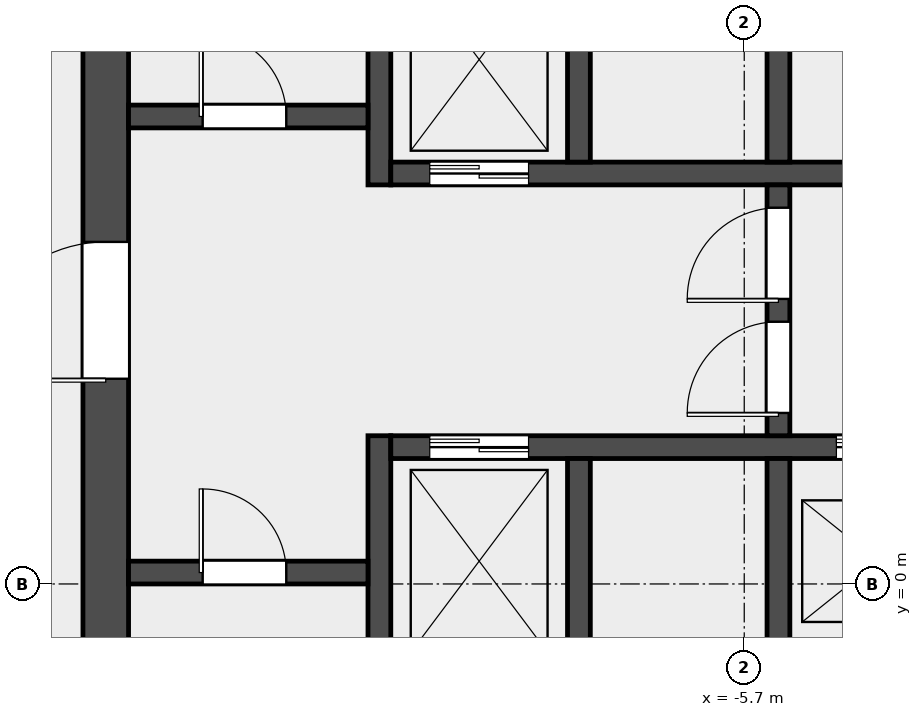
"""IFC4 building model, lengths in metres.
Left out: names, types, materials, properties, quantities, classifications, styles, units other than length and angle.
Written with IfcOpenShell. Run it as: python <this file> out.ifc"""

import sys

from ifc_helpers import new_model, si_unit, direction, frame, frame_2d, origin, place, context, subcontext, project, spatial, rectangle, extrude, element, fill, save


model = new_model("IFC4")
c1 = context("Model", 3, precision=1e-05, world=origin(), true_north=direction((0.0, 1.0)))
c2 = subcontext(c1, "Body", "Model", "MODEL_VIEW")
j1 = project(units=[si_unit("LENGTHUNIT", "METRE"), si_unit("PLANEANGLEUNIT", "RADIAN")], contexts=[c1])
p1 = place(None, origin())
s1 = spatial("IfcSite", under=j1, at=p1, CompositionType="ELEMENT")
p2 = place(p1, origin())
s2 = spatial("IfcBuilding", under=s1, at=p2, CompositionType="ELEMENT")
p3 = place(p2, frame((0.0, 0.0, 139.6)))
s3 = spatial("IfcBuildingStorey", under=s2, at=p3, CompositionType="ELEMENT", Elevation=139.6)
p4 = place(p3, frame((-14.1, -6.6, 0.0), z_axis=(0.0, 0.0, 1.0), x_axis=(0.0, 1.0, 0.0)))
e1 = element("IfcWall", 1, at=p4, inside=s3, PredefinedType="SHEAR", context=c2, shape_type="SweptSolid", body=[
    extrude(rectangle(XDim=19.5, YDim=0.6, at=frame_2d((9.75, 0.0))), origin(), (0.0, 0.0, 1.0), 4.2),
])
p5 = place(p4, frame((9.3, 0.0, 0.0)))
e2 = element("IfcOpeningElement", 2, at=p5, cuts=e1, PredefinedType="OPENING", context=c2, shape_type="SweptSolid", body=[
    extrude(rectangle(XDim=1.8, YDim=2.1, at=frame_2d((0.9, 1.05))), frame((0.0, 0.312, 0.0), z_axis=(0.0, -1.0, 0.0), x_axis=(1.0, 0.0, 0.0)), (0.0, 0.0, 1.0), 0.624),
])
p6 = place(p3, frame((-10.5, -6.6, 0.0), z_axis=(0.0, 0.0, 1.0), x_axis=(0.0, 1.0, 0.0)))
e3 = element("IfcWall", 3, at=p6, inside=s3, PredefinedType="SHEAR", context=c2, shape_type="SweptSolid", body=[
    extrude(rectangle(XDim=8.55, YDim=0.3, at=frame_2d((4.275, 0.0))), origin(), (0.0, 0.0, 1.0), 4.2),
])
p7 = place(p3, frame((-10.5, 5.25, 0.0), z_axis=(0.0, 0.0, 1.0), x_axis=(0.0, 1.0, 0.0)))
e4 = element("IfcWall", 4, at=p7, inside=s3, PredefinedType="SHEAR", context=c2, shape_type="SweptSolid", body=[
    extrude(rectangle(XDim=7.65, YDim=0.3, at=frame_2d((3.825, 0.0))), origin(), (0.0, 0.0, 1.0), 4.2),
])
p8 = place(p3, frame((-13.8, 0.15, 0.0), z_axis=(0.0, 0.0, 1.0), x_axis=(1.0, 0.0, 0.0)))
e5 = element("IfcWall", 5, at=p8, inside=s3, PredefinedType="SOLIDWALL", context=c2, shape_type="SweptSolid", body=[
    extrude(rectangle(XDim=3.15, YDim=0.3, at=frame_2d((1.575, 0.0))), origin(), (0.0, 0.0, 1.0), 4.2),
])
p9 = place(p8, frame((0.975, 0.0, 0.0)))
e6 = element("IfcOpeningElement", 6, at=p9, cuts=e5, PredefinedType="OPENING", context=c2, shape_type="SweptSolid", body=[
    extrude(rectangle(XDim=1.1, YDim=2.1, at=frame_2d((0.55, 1.05))), frame((0.0, 0.162, 0.0), z_axis=(0.0, -1.0, 0.0), x_axis=(1.0, 0.0, 0.0)), (0.0, 0.0, 1.0), 0.324),
])
p10 = place(p3, frame((-13.8, 6.15, 0.0), z_axis=(0.0, 0.0, 1.0), x_axis=(1.0, 0.0, 0.0)))
e7 = element("IfcWall", 7, at=p10, inside=s3, PredefinedType="SOLIDWALL", context=c2, shape_type="SweptSolid", body=[
    extrude(rectangle(XDim=3.15, YDim=0.3, at=frame_2d((1.575, 0.0))), origin(), (0.0, 0.0, 1.0), 4.2),
])
p11 = place(p10, frame((0.975, 0.0, 0.0)))
e8 = element("IfcOpeningElement", 8, at=p11, cuts=e7, PredefinedType="OPENING", context=c2, shape_type="SweptSolid", body=[
    extrude(rectangle(XDim=1.1, YDim=2.1, at=frame_2d((0.55, 1.05))), frame((0.0, 0.162, 0.0), z_axis=(0.0, -1.0, 0.0), x_axis=(1.0, 0.0, 0.0)), (0.0, 0.0, 1.0), 0.324),
])
p12 = place(p3, frame((-10.35, 1.8, 0.0), z_axis=(0.0, 0.0, 1.0), x_axis=(1.0, 0.0, 0.0)))
e9 = element("IfcWall", 9, at=p12, inside=s3, PredefinedType="SOLIDWALL", context=c2, shape_type="SweptSolid", body=[
    extrude(rectangle(XDim=20.7, YDim=0.3, at=frame_2d((10.35, 0.0))), origin(), (0.0, 0.0, 1.0), 4.2),
])
p13 = place(p12, frame((0.512, 0.0, 0.0)))
e10 = element("IfcOpeningElement", 10, at=p13, cuts=e9, PredefinedType="OPENING", context=c2, shape_type="SweptSolid", body=[
    extrude(rectangle(XDim=1.3, YDim=2.1, at=frame_2d((0.65, 1.05))), frame((0.0, 0.162, 0.0), z_axis=(0.0, -1.0, 0.0), x_axis=(1.0, 0.0, 0.0)), (0.0, 0.0, 1.0), 0.324),
])
p14 = place(p12, frame((5.863, 0.0, 0.0)))
e11 = element("IfcOpeningElement", 11, at=p14, cuts=e9, PredefinedType="OPENING", context=c2, shape_type="SweptSolid", body=[
    extrude(rectangle(XDim=1.1, YDim=2.1, at=frame_2d((0.55, 1.05))), frame((0.0, 0.162, 0.0), z_axis=(0.0, -1.0, 0.0), x_axis=(1.0, 0.0, 0.0)), (0.0, 0.0, 1.0), 0.324),
])
p15 = place(p12, frame((8.488, 0.0, 0.0)))
e12 = element("IfcOpeningElement", 12, at=p15, cuts=e9, PredefinedType="OPENING", context=c2, shape_type="SweptSolid", body=[
    extrude(rectangle(XDim=1.1, YDim=2.1, at=frame_2d((0.55, 1.05))), frame((0.0, 0.162, 0.0), z_axis=(0.0, -1.0, 0.0), x_axis=(1.0, 0.0, 0.0)), (0.0, 0.0, 1.0), 0.324),
])
p16 = place(p12, frame((11.113, 0.0, 0.0)))
e13 = element("IfcOpeningElement", 13, at=p16, cuts=e9, PredefinedType="OPENING", context=c2, shape_type="SweptSolid", body=[
    extrude(rectangle(XDim=1.1, YDim=2.1, at=frame_2d((0.55, 1.05))), frame((0.0, 0.162, 0.0), z_axis=(0.0, -1.0, 0.0), x_axis=(1.0, 0.0, 0.0)), (0.0, 0.0, 1.0), 0.324),
])
p17 = place(p12, frame((13.738, 0.0, 0.0)))
e14 = element("IfcOpeningElement", 14, at=p17, cuts=e9, PredefinedType="OPENING", context=c2, shape_type="SweptSolid", body=[
    extrude(rectangle(XDim=1.1, YDim=2.1, at=frame_2d((0.55, 1.05))), frame((0.0, 0.162, 0.0), z_axis=(0.0, -1.0, 0.0), x_axis=(1.0, 0.0, 0.0)), (0.0, 0.0, 1.0), 0.324),
])
p18 = place(p12, frame((16.363, 0.0, 0.0)))
e15 = element("IfcOpeningElement", 15, at=p18, cuts=e9, PredefinedType="OPENING", context=c2, shape_type="SweptSolid", body=[
    extrude(rectangle(XDim=1.1, YDim=2.1, at=frame_2d((0.55, 1.05))), frame((0.0, 0.162, 0.0), z_axis=(0.0, -1.0, 0.0), x_axis=(1.0, 0.0, 0.0)), (0.0, 0.0, 1.0), 0.324),
])
p19 = place(p12, frame((18.988, 0.0, 0.0)))
e16 = element("IfcOpeningElement", 16, at=p19, cuts=e9, PredefinedType="OPENING", context=c2, shape_type="SweptSolid", body=[
    extrude(rectangle(XDim=1.1, YDim=2.1, at=frame_2d((0.55, 1.05))), frame((0.0, 0.162, 0.0), z_axis=(0.0, -1.0, 0.0), x_axis=(1.0, 0.0, 0.0)), (0.0, 0.0, 1.0), 0.324),
])
p20 = place(p3, frame((-10.35, 5.4, 0.0), z_axis=(0.0, 0.0, 1.0), x_axis=(1.0, 0.0, 0.0)))
e17 = element("IfcWall", 17, at=p20, inside=s3, PredefinedType="SOLIDWALL", context=c2, shape_type="SweptSolid", body=[
    extrude(rectangle(XDim=20.7, YDim=0.3, at=frame_2d((10.35, 0.0))), origin(), (0.0, 0.0, 1.0), 4.2),
])
p21 = place(p20, frame((0.512, 0.0, 0.0)))
e18 = element("IfcOpeningElement", 18, at=p21, cuts=e17, PredefinedType="OPENING", context=c2, shape_type="SweptSolid", body=[
    extrude(rectangle(XDim=1.3, YDim=2.1, at=frame_2d((0.65, 1.05))), frame((0.0, 0.162, 0.0), z_axis=(0.0, -1.0, 0.0), x_axis=(1.0, 0.0, 0.0)), (0.0, 0.0, 1.0), 0.324),
])
for number, where, z_axis, x_axis in (
    (19, (-7.875, -1.05, 0.0), (0.0, 0.0, 1.0), (0.0, 1.0, 0.0)),
    (20, (-5.25, -1.05, 0.0), (0.0, 0.0, 1.0), (0.0, 1.0, 0.0)),
    (21, (-7.875, 5.55, 0.0), (0.0, 0.0, 1.0), (0.0, 1.0, 0.0)),
    (22, (-5.25, 5.55, 0.0), (0.0, 0.0, 1.0), (0.0, 1.0, 0.0)),
):
    element("IfcWall", number, at=place(p3, frame(where, z_axis=z_axis, x_axis=x_axis)), inside=s3, PredefinedType="SOLIDWALL", context=c2, shape_type="SweptSolid", body=[
        extrude(rectangle(XDim=2.7, YDim=0.3, at=frame_2d((1.35, 0.0))), origin(), (0.0, 0.0, 1.0), 4.2),
    ])
p22 = place(p3, frame((-5.25, 1.95, 0.0), z_axis=(0.0, 0.0, 1.0), x_axis=(0.0, 1.0, 0.0)))
e23 = element("IfcWall", 23, at=p22, inside=s3, PredefinedType="SOLIDWALL", context=c2, shape_type="SweptSolid", body=[
    extrude(rectangle(XDim=3.3, YDim=0.3, at=frame_2d((1.65, 0.0))), origin(), (0.0, 0.0, 1.0), 4.2),
])
p23 = place(p22, frame((0.3, 0.0, 0.0)))
e24 = element("IfcOpeningElement", 24, at=p23, cuts=e23, PredefinedType="OPENING", context=c2, shape_type="SweptSolid", body=[
    extrude(rectangle(XDim=1.2, YDim=2.1, at=frame_2d((0.6, 1.05))), frame((0.0, 0.162, 0.0), z_axis=(0.0, -1.0, 0.0), x_axis=(1.0, 0.0, 0.0)), (0.0, 0.0, 1.0), 0.324),
])
p24 = place(p22, frame((1.8, 0.0, 0.0)))
e25 = element("IfcOpeningElement", 25, at=p24, cuts=e23, PredefinedType="OPENING", context=c2, shape_type="SweptSolid", body=[
    extrude(rectangle(XDim=1.2, YDim=2.1, at=frame_2d((0.6, 1.05))), frame((0.0, 0.162, 0.0), z_axis=(0.0, -1.0, 0.0), x_axis=(1.0, 0.0, 0.0)), (0.0, 0.0, 1.0), 0.324),
])
p25 = place(p9, origin())
e26 = element("IfcDoor", 26, at=p25, inside=s3, OperationType="SINGLE_SWING_LEFT", PredefinedType="DOOR", context=c2, shape_type="SweptSolid", body=[
    extrude(rectangle(XDim=1.1, YDim=2.1, at=frame_2d((0.55, 1.05))), frame((0.0, 0.025, 0.0), z_axis=(0.0, -1.0, 0.0), x_axis=(1.0, 0.0, 0.0)), (0.0, 0.0, 1.0), 0.05),
])
fill(e6, e26)
p26 = place(p11, origin())
e27 = element("IfcDoor", 27, at=p26, inside=s3, OperationType="SINGLE_SWING_LEFT", PredefinedType="DOOR", context=c2, shape_type="SweptSolid", body=[
    extrude(rectangle(XDim=1.1, YDim=2.1, at=frame_2d((0.55, 1.05))), frame((0.0, 0.025, 0.0), z_axis=(0.0, -1.0, 0.0), x_axis=(1.0, 0.0, 0.0)), (0.0, 0.0, 1.0), 0.05),
])
fill(e8, e27)
p27 = place(p5, origin())
e28 = element("IfcDoor", 28, at=p27, inside=s3, OperationType="DOUBLE_DOOR_SINGLE_SWING", PredefinedType="DOOR", context=c2, shape_type="SweptSolid", body=[
    extrude(rectangle(XDim=1.8, YDim=2.1, at=frame_2d((0.9, 1.05))), frame((0.0, 0.025, 0.0), z_axis=(0.0, -1.0, 0.0), x_axis=(1.0, 0.0, 0.0)), (0.0, 0.0, 1.0), 0.05),
])
fill(e2, e28)
p28 = place(p23, origin())
e29 = element("IfcDoor", 29, at=p28, inside=s3, OperationType="SINGLE_SWING_LEFT", PredefinedType="DOOR", context=c2, shape_type="SweptSolid", body=[
    extrude(rectangle(XDim=1.2, YDim=2.1, at=frame_2d((0.6, 1.05))), frame((0.0, 0.025, 0.0), z_axis=(0.0, -1.0, 0.0), x_axis=(1.0, 0.0, 0.0)), (0.0, 0.0, 1.0), 0.05),
])
fill(e24, e29)
p29 = place(p24, origin())
e30 = element("IfcDoor", 30, at=p29, inside=s3, OperationType="SINGLE_SWING_RIGHT", PredefinedType="DOOR", context=c2, shape_type="SweptSolid", body=[
    extrude(rectangle(XDim=1.2, YDim=2.1, at=frame_2d((0.6, 1.05))), frame((0.0, 0.025, 0.0), z_axis=(0.0, -1.0, 0.0), x_axis=(1.0, 0.0, 0.0)), (0.0, 0.0, 1.0), 0.05),
])
fill(e25, e30)
p30 = place(p13, origin())
e31 = element("IfcDoor", 31, at=p30, inside=s3, OperationType="DOUBLE_DOOR_SLIDING", PredefinedType="DOOR", context=c2, shape_type="SweptSolid", body=[
    extrude(rectangle(XDim=1.3, YDim=2.1, at=frame_2d((0.65, 1.05))), frame((0.0, 0.025, 0.0), z_axis=(0.0, -1.0, 0.0), x_axis=(1.0, 0.0, 0.0)), (0.0, 0.0, 1.0), 0.05),
])
fill(e10, e31)
p31 = place(p14, origin())
e32 = element("IfcDoor", 32, at=p31, inside=s3, OperationType="DOUBLE_DOOR_SLIDING", PredefinedType="DOOR", context=c2, shape_type="SweptSolid", body=[
    extrude(rectangle(XDim=1.1, YDim=2.1, at=frame_2d((0.55, 1.05))), frame((0.0, 0.025, 0.0), z_axis=(0.0, -1.0, 0.0), x_axis=(1.0, 0.0, 0.0)), (0.0, 0.0, 1.0), 0.05),
])
fill(e11, e32)
p32 = place(p21, origin())
e33 = element("IfcDoor", 33, at=p32, inside=s3, OperationType="DOUBLE_DOOR_SLIDING", PredefinedType="DOOR", context=c2, shape_type="SweptSolid", body=[
    extrude(rectangle(XDim=1.3, YDim=2.1, at=frame_2d((0.65, 1.05))), frame((0.0, 0.025, 0.0), z_axis=(0.0, -1.0, 0.0), x_axis=(1.0, 0.0, 0.0)), (0.0, 0.0, 1.0), 0.05),
])
fill(e18, e33)
save(model, sys.argv[1])
